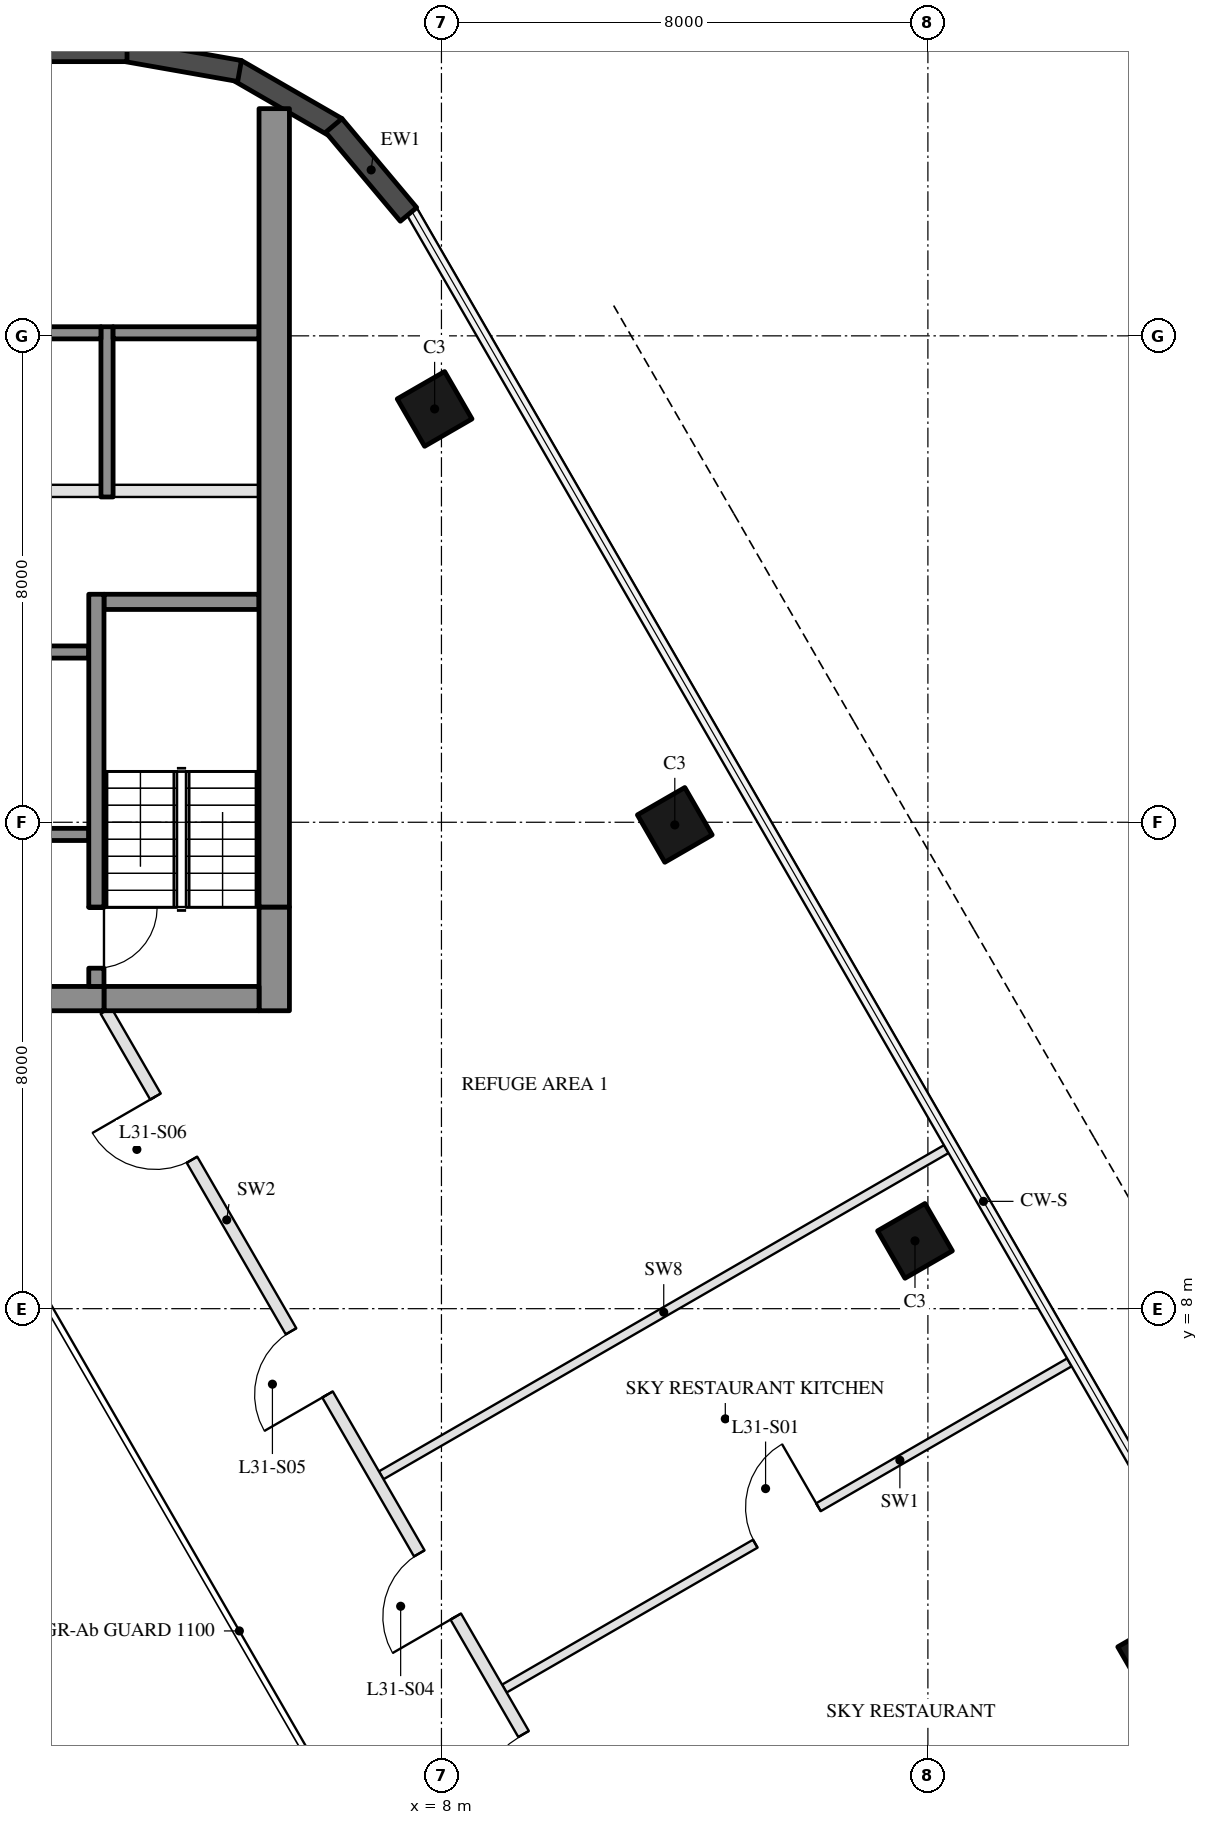
"""IFC4 building model, lengths in metres.
Left out: names, types, materials, properties, quantities, classifications, styles, units other than length and angle.
Written with IfcOpenShell. Run it as: python <this file> out.ifc"""

import sys

from ifc_helpers import new_model, si_unit, direction, frame, frame_2d, origin, origin_2d, place, context, subcontext, project, spatial, rectangle, hollow_rectangle, extrude, element, fill, save


model = new_model("IFC4")
c1 = context("Model", 3, precision=1e-05, world=origin(), true_north=direction((0.0, 1.0)))
c2 = subcontext(c1, "Body", "Model", "MODEL_VIEW")
j1 = project(units=[si_unit("LENGTHUNIT", "METRE"), si_unit("PLANEANGLEUNIT", "RADIAN")], contexts=[c1])
p1 = place(None, origin())
s1 = spatial("IfcSite", under=j1, at=p1, CompositionType="ELEMENT")
p2 = place(p1, origin())
s2 = spatial("IfcBuilding", under=s1, at=p2, CompositionType="ELEMENT")
p3 = place(p2, frame((0.0, 0.0, 131.6)))
s3 = spatial("IfcBuildingStorey", under=s2, at=p3, CompositionType="ELEMENT", Elevation=131.6)
for number, where, z_axis, x_axis in (
    (1, (19.738, 2.273, 0.0), (0.0, 0.0, 1.0), (-0.5, 0.866, 0.0)),
    (2, (15.788, 9.115, 0.0), (0.0, 0.0, 1.0), (-0.5, 0.866, 0.0)),
    (3, (11.838, 15.957, 0.0), (0.0, 0.0, 1.0), (-0.5, 0.866, 0.0)),
    (4, (7.888, 22.798, 0.0), (0.0, 0.0, 1.0), (-0.5, 0.866, 0.0)),
):
    element("IfcColumn", number, at=place(p3, frame(where, z_axis=z_axis, x_axis=x_axis)), inside=s3, PredefinedType="COLUMN", context=c2, shape_type="SweptSolid", body=[
        extrude(hollow_rectangle(XDim=0.9, YDim=0.9, WallThickness=0.04, at=origin_2d()), origin(), (0.0, 0.0, 1.0), 6.0),
    ])
for number, where, z_axis, x_axis in (
    (5, (6.277, 27.422, 0.0), (0.0, 0.0, 1.0), (-0.866, 0.5, 0.0)),
    (6, (4.68, 28.356, 0.0), (0.0, 0.0, 1.0), (-0.985, 0.174, 0.0)),
):
    element("IfcWall", number, at=place(p3, frame(where, z_axis=z_axis, x_axis=x_axis)), inside=s3, PredefinedType="SOLIDWALL", context=c2, shape_type="SweptSolid", body=[
        extrude(rectangle(XDim=1.91, YDim=0.35, at=frame_2d((0.955, 0.0))), origin(), (0.0, 0.0, 1.0), 5.7),
    ])
p4 = place(p3, frame((2.829, 28.685, 0.0), z_axis=(0.0, 0.0, 1.0), x_axis=(-1.0, 0.0, 0.0)))
e7 = element("IfcWall", 7, at=p4, inside=s3, PredefinedType="SOLIDWALL", context=c2, shape_type="SweptSolid", body=[
    extrude(rectangle(XDim=5.658, YDim=0.35, at=frame_2d((2.829, 0.0))), origin(), (0.0, 0.0, 1.0), 5.7),
])
p5 = place(p3, frame((7.458, 25.998, 0.0), z_axis=(0.0, 0.0, 1.0), x_axis=(-0.642808304945, 0.766027077259, 0.0)))
e8 = element("IfcWall", 8, at=p5, inside=s3, PredefinedType="SOLIDWALL", context=c2, shape_type="SweptSolid", body=[
    extrude(rectangle(XDim=1.91, YDim=0.35, at=frame_2d((0.955, 0.0))), origin(), (0.0, 0.0, 1.0), 5.7),
])
p6 = place(p3, frame((5.0, 19.625, 0.0), z_axis=(0.0, 0.0, 1.0), x_axis=(-1.0, 0.0, 0.0)))
e9 = element("IfcWall", 9, at=p6, inside=s3, PredefinedType="SHEAR", context=c2, shape_type="SweptSolid", body=[
    extrude(rectangle(XDim=2.55, YDim=0.25, at=frame_2d((1.275, 0.0))), origin(), (0.0, 0.0, 1.0), 5.7),
])
p7 = place(p3, frame((2.2, 18.8, 0.0), z_axis=(0.0, 0.0, 1.0), x_axis=(-1.0, 0.0, 0.0)))
e10 = element("IfcWall", 10, at=p7, inside=s3, PredefinedType="SHEAR", context=c2, shape_type="SweptSolid", body=[
    extrude(rectangle(XDim=2.8, YDim=0.2, at=frame_2d((1.4, 0.0))), origin(), (0.0, 0.0, 1.0), 5.7),
])
p8 = place(p3, frame((2.2, 15.8, 0.0), z_axis=(0.0, 0.0, 1.0), x_axis=(-1.0, 0.0, 0.0)))
e11 = element("IfcWall", 11, at=p8, inside=s3, PredefinedType="SHEAR", context=c2, shape_type="SweptSolid", body=[
    extrude(rectangle(XDim=2.8, YDim=0.2, at=frame_2d((1.4, 0.0))), origin(), (0.0, 0.0, 1.0), 5.7),
])
p9 = place(p8, frame((0.7, 0.0, 0.0)))
e12 = element("IfcOpeningElement", 12, at=p9, cuts=e11, PredefinedType="OPENING", context=c2, shape_type="SweptSolid", body=[
    extrude(rectangle(XDim=1.2, YDim=2.1, at=frame_2d((0.6, 1.05))), frame((0.0, 0.11, 0.0), z_axis=(0.0, -1.0, 0.0), x_axis=(1.0, 0.0, 0.0)), (0.0, 0.0, 1.0), 0.22),
])
p10 = place(p3, frame((2.5, 21.35, 0.0), z_axis=(0.0, 0.0, 1.0), x_axis=(0.0, 1.0, 0.0)))
e13 = element("IfcWall", 13, at=p10, inside=s3, PredefinedType="SHEAR", context=c2, shape_type="SweptSolid", body=[
    extrude(rectangle(XDim=2.8, YDim=0.2, at=frame_2d((1.4, 0.0))), origin(), (0.0, 0.0, 1.0), 5.7),
])
p11 = place(p3, frame((5.0, 24.05, 0.0), z_axis=(0.0, 0.0, 1.0), x_axis=(-1.0, 0.0, 0.0)))
e14 = element("IfcWall", 14, at=p11, inside=s3, PredefinedType="SHEAR", context=c2, shape_type="SweptSolid", body=[
    extrude(rectangle(XDim=2.4, YDim=0.2, at=frame_2d((1.2, 0.0))), origin(), (0.0, 0.0, 1.0), 5.7),
])
p12 = place(p3, frame((2.4, 24.05, 0.0), z_axis=(0.0, 0.0, 1.0), x_axis=(-1.0, 0.0, 0.0)))
e15 = element("IfcWall", 15, at=p12, inside=s3, PredefinedType="SHEAR", context=c2, shape_type="SweptSolid", body=[
    extrude(rectangle(XDim=2.8, YDim=0.2, at=frame_2d((1.4, 0.0))), origin(), (0.0, 0.0, 1.0), 5.7),
])
p13 = place(p3, frame((5.0, 21.45, 0.0), z_axis=(0.0, 0.0, 1.0), x_axis=(-1.0, 0.0, 0.0)))
e16 = element("IfcWall", 16, at=p13, inside=s3, PredefinedType="PARTITIONING", context=c2, shape_type="SweptSolid", body=[
    extrude(rectangle(XDim=2.4, YDim=0.2, at=frame_2d((1.2, 0.0))), origin(), (0.0, 0.0, 1.0), 5.7),
])
p14 = place(p3, frame((2.4, 21.45, 0.0), z_axis=(0.0, 0.0, 1.0), x_axis=(-1.0, 0.0, 0.0)))
e17 = element("IfcWall", 17, at=p14, inside=s3, PredefinedType="PARTITIONING", context=c2, shape_type="SweptSolid", body=[
    extrude(rectangle(XDim=2.8, YDim=0.2, at=frame_2d((1.4, 0.0))), origin(), (0.0, 0.0, 1.0), 5.7),
])
p15 = place(p3, frame((5.25, 12.9, 0.0), z_axis=(0.0, 0.0, 1.0), x_axis=(0.0, 1.0, 0.0)))
e18 = element("IfcWall", 18, at=p15, inside=s3, PredefinedType="SHEAR", context=c2, shape_type="SweptSolid", body=[
    extrude(rectangle(XDim=1.706, YDim=0.5, at=frame_2d((0.853, 0.0))), origin(), (0.0, 0.0, 1.0), 5.7),
])
p16 = place(p3, frame((5.25, 14.606, 0.0), z_axis=(0.0, 0.0, 1.0), x_axis=(0.0, 1.0, 0.0)))
e19 = element("IfcWall", 19, at=p16, inside=s3, PredefinedType="SHEAR", context=c2, shape_type="SweptSolid", body=[
    extrude(rectangle(XDim=13.131, YDim=0.5, at=frame_2d((6.565, 0.0))), origin(), (0.0, 0.0, 1.0), 5.7),
])
p17 = place(p3, frame((5.0, 13.1, 0.0), z_axis=(0.0, 0.0, 1.0), x_axis=(-1.0, 0.0, 0.0)))
e20 = element("IfcWall", 20, at=p17, inside=s3, PredefinedType="SHEAR", context=c2, shape_type="SweptSolid", body=[
    extrude(rectangle(XDim=2.55, YDim=0.4, at=frame_2d((1.275, 0.0))), origin(), (0.0, 0.0, 1.0), 5.7),
])
p18 = place(p3, frame((2.45, 13.1, 0.0), z_axis=(0.0, 0.0, 1.0), x_axis=(-1.0, 0.0, 0.0)))
e21 = element("IfcWall", 21, at=p18, inside=s3, PredefinedType="SHEAR", context=c2, shape_type="SweptSolid", body=[
    extrude(rectangle(XDim=7.45, YDim=0.4, at=frame_2d((3.725, 0.0))), origin(), (0.0, 0.0, 1.0), 5.7),
])
p19 = place(p18, frame((1.0, 0.0, 0.0)))
e22 = element("IfcOpeningElement", 22, at=p19, cuts=e21, PredefinedType="OPENING", context=c2, shape_type="SweptSolid", body=[
    extrude(rectangle(XDim=1.1, YDim=2.1, at=frame_2d((0.55, 1.05))), frame((0.0, 0.21, 0.0), z_axis=(0.0, -1.0, 0.0), x_axis=(1.0, 0.0, 0.0)), (0.0, 0.0, 1.0), 0.42),
])
p20 = place(p18, frame((3.3, 0.0, 0.0)))
e23 = element("IfcOpeningElement", 23, at=p20, cuts=e21, PredefinedType="OPENING", context=c2, shape_type="SweptSolid", body=[
    extrude(rectangle(XDim=1.4, YDim=2.1, at=frame_2d((0.7, 1.05))), frame((0.0, 0.21, 0.0), z_axis=(0.0, -1.0, 0.0), x_axis=(1.0, 0.0, 0.0)), (0.0, 0.0, 1.0), 0.42),
])
p21 = place(p3, frame((2.325, 13.3, 0.0), z_axis=(0.0, 0.0, 1.0), x_axis=(0.0, 1.0, 0.0)))
e24 = element("IfcWall", 24, at=p21, inside=s3, PredefinedType="SHEAR", context=c2, shape_type="SweptSolid", body=[
    extrude(rectangle(XDim=1.306, YDim=0.25, at=frame_2d((0.653, 0.0))), origin(), (0.0, 0.0, 1.0), 5.7),
])
p22 = place(p21, frame((0.3, 0.0, 0.0)))
e25 = element("IfcOpeningElement", 25, at=p22, cuts=e24, PredefinedType="OPENING", context=c2, shape_type="SweptSolid", body=[
    extrude(rectangle(XDim=1.0, YDim=2.1, at=frame_2d((0.5, 1.05))), frame((0.0, 0.135, 0.0), z_axis=(0.0, -1.0, 0.0), x_axis=(1.0, 0.0, 0.0)), (0.0, 0.0, 1.0), 0.27),
])
p23 = place(p3, frame((2.325, 14.606, 0.0), z_axis=(0.0, 0.0, 1.0), x_axis=(0.0, 1.0, 0.0)))
e26 = element("IfcWall", 26, at=p23, inside=s3, PredefinedType="SHEAR", context=c2, shape_type="SweptSolid", body=[
    extrude(rectangle(XDim=5.144, YDim=0.25, at=frame_2d((2.572, 0.0))), origin(), (0.0, 0.0, 1.0), 5.7),
])
p24 = place(p3, frame((18.327, 7.117, 0.0), z_axis=(0.0, 0.0, 1.0), x_axis=(-0.866026447599, -0.499998192055, 0.0)))
e27 = element("IfcWall", 27, at=p24, inside=s3, PredefinedType="PARTITIONING", context=c2, shape_type="SweptSolid", body=[
    extrude(rectangle(XDim=10.73, YDim=0.15, at=frame_2d((5.365, 0.0))), origin(), (0.0, 0.0, 1.0), 5.7),
])
p25 = place(p24, frame((4.765, 0.0, 0.0)))
e28 = element("IfcOpeningElement", 28, at=p25, cuts=e27, PredefinedType="OPENING", context=c2, shape_type="SweptSolid", body=[
    extrude(rectangle(XDim=1.2, YDim=2.1, at=frame_2d((0.6, 1.05))), frame((0.0, 0.085, 0.0), z_axis=(0.0, -1.0, 0.0), x_axis=(1.0, 0.0, 0.0)), (0.0, 0.0, 1.0), 0.17),
])
p26 = place(p3, frame((16.302, 10.624, 0.0), z_axis=(0.0, 0.0, 1.0), x_axis=(-0.866026447599, -0.499998192055, 0.0)))
e29 = element("IfcWall", 29, at=p26, inside=s3, PredefinedType="PARTITIONING", context=c2, shape_type="SweptSolid", body=[
    extrude(rectangle(XDim=10.73, YDim=0.15, at=frame_2d((5.365, 0.0))), origin(), (0.0, 0.0, 1.0), 5.7),
])
p27 = place(p3, frame((12.413, -4.3, 0.0), z_axis=(0.0, 0.0, 1.0), x_axis=(-0.50000478328, 0.866022642139, 0.0)))
e30 = element("IfcWall", 30, at=p27, inside=s3, PredefinedType="PARTITIONING", context=c2, shape_type="SweptSolid", body=[
    extrude(rectangle(XDim=19.861, YDim=0.2, at=frame_2d((9.931, 0.0))), origin(), (0.0, 0.0, 1.0), 4.91),
])
p28 = place(p27, frame((1.142, 0.0, 0.0)))
e31 = element("IfcOpeningElement", 31, at=p28, cuts=e30, PredefinedType="OPENING", context=c2, shape_type="SweptSolid", body=[
    extrude(rectangle(XDim=1.8, YDim=2.4, at=frame_2d((0.9, 1.2))), frame((0.0, 0.11, 0.0), z_axis=(0.0, -1.0, 0.0), x_axis=(1.0, 0.0, 0.0)), (0.0, 0.0, 1.0), 0.22),
])
p29 = place(p27, frame((4.325, 0.0, 0.0)))
e32 = element("IfcOpeningElement", 32, at=p29, cuts=e30, PredefinedType="OPENING", context=c2, shape_type="SweptSolid", body=[
    extrude(rectangle(XDim=1.8, YDim=2.4, at=frame_2d((0.9, 1.2))), frame((0.0, 0.11, 0.0), z_axis=(0.0, -1.0, 0.0), x_axis=(1.0, 0.0, 0.0)), (0.0, 0.0, 1.0), 0.22),
])
p30 = place(p27, frame((8.355, 0.0, 0.0)))
e33 = element("IfcOpeningElement", 33, at=p30, cuts=e30, PredefinedType="OPENING", context=c2, shape_type="SweptSolid", body=[
    extrude(rectangle(XDim=1.2, YDim=2.1, at=frame_2d((0.6, 1.05))), frame((0.0, 0.11, 0.0), z_axis=(0.0, -1.0, 0.0), x_axis=(1.0, 0.0, 0.0)), (0.0, 0.0, 1.0), 0.22),
])
p31 = place(p27, frame((12.573, 0.0, 0.0)))
e34 = element("IfcOpeningElement", 34, at=p31, cuts=e30, PredefinedType="OPENING", context=c2, shape_type="SweptSolid", body=[
    extrude(rectangle(XDim=1.2, YDim=2.1, at=frame_2d((0.6, 1.05))), frame((0.0, 0.11, 0.0), z_axis=(0.0, -1.0, 0.0), x_axis=(1.0, 0.0, 0.0)), (0.0, 0.0, 1.0), 0.22),
])
p32 = place(p27, frame((17.032, 0.0, 0.0)))
e35 = element("IfcOpeningElement", 35, at=p32, cuts=e30, PredefinedType="OPENING", context=c2, shape_type="SweptSolid", body=[
    extrude(rectangle(XDim=1.2, YDim=2.1, at=frame_2d((0.6, 1.05))), frame((0.0, 0.11, 0.0), z_axis=(0.0, -1.0, 0.0), x_axis=(1.0, 0.0, 0.0)), (0.0, 0.0, 1.0), 0.22),
])
p33 = place(p22, frame((1.0, 0.0, 0.0), z_axis=(0.0, 0.0, 1.0), x_axis=(-1.0, 0.0, 0.0)))
e36 = element("IfcDoor", 36, at=p33, inside=s3, OperationType="SINGLE_SWING_LEFT", PredefinedType="DOOR", context=c2, shape_type="SweptSolid", body=[
    extrude(rectangle(XDim=1.0, YDim=2.1, at=frame_2d((0.5, 1.05))), frame((0.0, 0.025, 0.0), z_axis=(0.0, -1.0, 0.0), x_axis=(1.0, 0.0, 0.0)), (0.0, 0.0, 1.0), 0.05),
])
fill(e25, e36)
p34 = place(p25, frame((1.2, 0.0, 0.0), z_axis=(0.0, 0.0, 1.0), x_axis=(-1.0, 0.0, 0.0)))
e37 = element("IfcDoor", 37, at=p34, inside=s3, OperationType="SINGLE_SWING_RIGHT", PredefinedType="DOOR", context=c2, shape_type="SweptSolid", body=[
    extrude(rectangle(XDim=1.2, YDim=2.1, at=frame_2d((0.6, 1.05))), frame((0.0, 0.025, 0.0), z_axis=(0.0, -1.0, 0.0), x_axis=(1.0, 0.0, 0.0)), (0.0, 0.0, 1.0), 0.05),
])
fill(e28, e37)
p35 = place(p29, origin())
e38 = element("IfcDoor", 38, at=p35, inside=s3, OperationType="DOUBLE_DOOR_SINGLE_SWING", PredefinedType="DOOR", context=c2, shape_type="SweptSolid", body=[
    extrude(rectangle(XDim=1.8, YDim=2.4, at=frame_2d((0.9, 1.2))), frame((0.0, 0.025, 0.0), z_axis=(0.0, -1.0, 0.0), x_axis=(1.0, 0.0, 0.0)), (0.0, 0.0, 1.0), 0.05),
])
fill(e32, e38)
p36 = place(p30, origin())
e39 = element("IfcDoor", 39, at=p36, inside=s3, OperationType="SINGLE_SWING_LEFT", PredefinedType="DOOR", context=c2, shape_type="SweptSolid", body=[
    extrude(rectangle(XDim=1.2, YDim=2.1, at=frame_2d((0.6, 1.05))), frame((0.0, 0.025, 0.0), z_axis=(0.0, -1.0, 0.0), x_axis=(1.0, 0.0, 0.0)), (0.0, 0.0, 1.0), 0.05),
])
fill(e33, e39)
p37 = place(p31, origin())
e40 = element("IfcDoor", 40, at=p37, inside=s3, OperationType="SINGLE_SWING_LEFT", PredefinedType="DOOR", context=c2, shape_type="SweptSolid", body=[
    extrude(rectangle(XDim=1.2, YDim=2.1, at=frame_2d((0.6, 1.05))), frame((0.0, 0.025, 0.0), z_axis=(0.0, -1.0, 0.0), x_axis=(1.0, 0.0, 0.0)), (0.0, 0.0, 1.0), 0.05),
])
fill(e34, e40)
p38 = place(p32, origin())
e41 = element("IfcDoor", 41, at=p38, inside=s3, OperationType="SINGLE_SWING_RIGHT", PredefinedType="DOOR", context=c2, shape_type="SweptSolid", body=[
    extrude(rectangle(XDim=1.2, YDim=2.1, at=frame_2d((0.6, 1.05))), frame((0.0, 0.025, 0.0), z_axis=(0.0, -1.0, 0.0), x_axis=(1.0, 0.0, 0.0)), (0.0, 0.0, 1.0), 0.05),
])
fill(e35, e41)
save(model, sys.argv[1])
